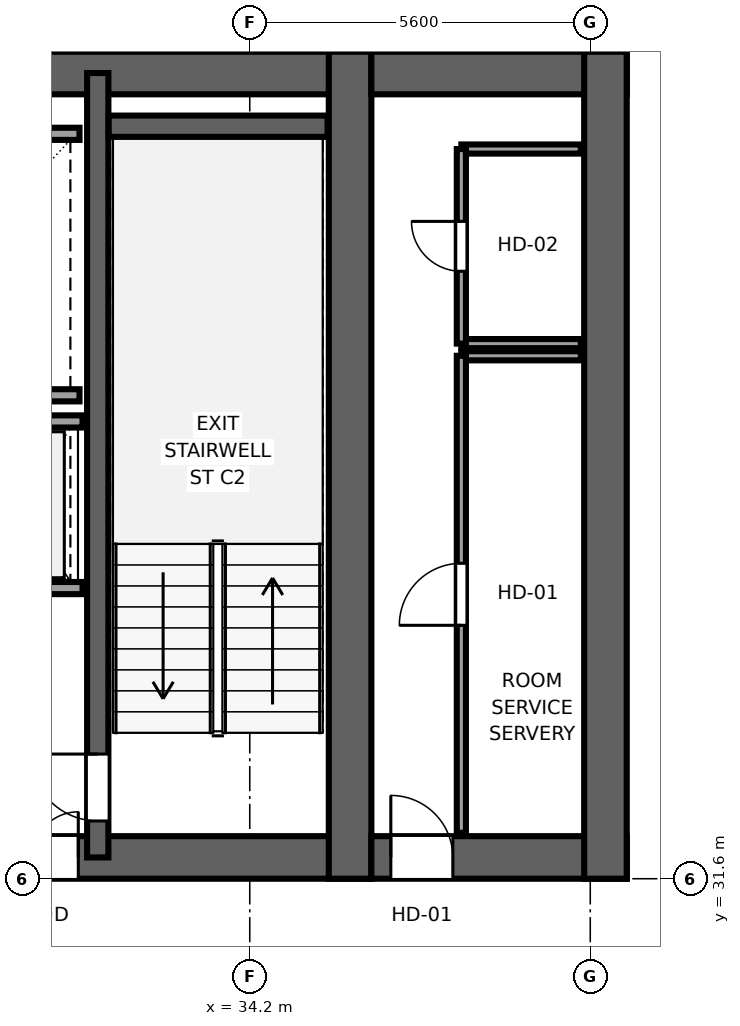
"""IFC4 building model, lengths in metres.
Left out: names, types, materials, properties, quantities, classifications, styles, units other than length and angle.
Written with IfcOpenShell. Run it as: python <this file> out.ifc"""

import sys

from ifc_helpers import new_model, si_unit, direction, frame, frame_2d, origin, place, context, subcontext, project, spatial, rectangle, extrude, source, transform, mapped, element, fill, save


model = new_model("IFC4")
c1 = context("Model", 3, precision=1e-05, world=origin(), true_north=direction((0.0, 1.0)))
c2 = subcontext(c1, "Body", "Model", "MODEL_VIEW")
j1 = project(units=[si_unit("LENGTHUNIT", "METRE"), si_unit("PLANEANGLEUNIT", "RADIAN")], contexts=[c1])
p1 = place(None, origin())
s1 = spatial("IfcSite", under=j1, at=p1, CompositionType="ELEMENT")
p2 = place(p1, origin())
s2 = spatial("IfcBuilding", under=s1, at=p2, CompositionType="ELEMENT")
p3 = place(p2, frame((0.0, 0.0, 104.45)))
s3 = spatial("IfcBuildingStorey", under=s2, at=p3, CompositionType="ELEMENT", Elevation=104.45)
p4 = place(p3, frame((9.8, 31.95, 0.0), z_axis=(0.0, 0.0, 1.0), x_axis=(1.0, 0.0, 0.0)))
e1 = element("IfcWall", 1, at=p4, inside=s3, PredefinedType="SHEAR", context=c2, shape_type="SweptSolid", body=[
    extrude(rectangle(XDim=26.4, YDim=0.7, at=frame_2d((13.2, 0.0))), origin(), (0.0, 0.0, 1.0), 3.55),
])
p5 = place(p4, frame((6.32, 0.0, 0.0), z_axis=(0.0, 0.0, 1.0), x_axis=(-1.0, 0.0, 0.0)))
e2 = element("IfcOpeningElement", 2, at=p5, cuts=e1, PredefinedType="OPENING", context=c2, shape_type="SweptSolid", body=[
    extrude(rectangle(XDim=1.5, YDim=2.04, at=frame_2d((0.75, 1.02))), frame((0.0, 0.36, 0.0), z_axis=(0.0, -1.0, 0.0), x_axis=(1.0, 0.0, 0.0)), (0.0, 0.0, 1.0), 0.72),
])
p6 = place(p4, frame((13.95, 0.0, 0.0), z_axis=(0.0, 0.0, 1.0), x_axis=(-1.0, 0.0, 0.0)))
e3 = element("IfcOpeningElement", 3, at=p6, cuts=e1, PredefinedType="OPENING", context=c2, shape_type="SweptSolid", body=[
    extrude(rectangle(XDim=1.5, YDim=2.04, at=frame_2d((0.75, 1.02))), frame((0.0, 0.36, 0.0), z_axis=(0.0, -1.0, 0.0), x_axis=(1.0, 0.0, 0.0)), (0.0, 0.0, 1.0), 0.72),
])
p7 = place(p4, frame((21.58, 0.0, 0.0), z_axis=(0.0, 0.0, 1.0), x_axis=(-1.0, 0.0, 0.0)))
e4 = element("IfcOpeningElement", 4, at=p7, cuts=e1, PredefinedType="OPENING", context=c2, shape_type="SweptSolid", body=[
    extrude(rectangle(XDim=1.5, YDim=2.04, at=frame_2d((0.75, 1.02))), frame((0.0, 0.36, 0.0), z_axis=(0.0, -1.0, 0.0), x_axis=(1.0, 0.0, 0.0)), (0.0, 0.0, 1.0), 0.72),
])
p8 = place(p4, frame((8.37, 0.0, 0.0), z_axis=(0.0, 0.0, 1.0), x_axis=(-1.0, 0.0, 0.0)))
e5 = element("IfcOpeningElement", 5, at=p8, cuts=e1, PredefinedType="OPENING", context=c2, shape_type="SweptSolid", body=[
    extrude(rectangle(XDim=0.82, YDim=2.01, at=frame_2d((0.41, 1.005))), frame((0.0, 0.36, 0.0), z_axis=(0.0, -1.0, 0.0), x_axis=(1.0, 0.0, 0.0)), (0.0, 0.0, 1.0), 0.72),
])
p9 = place(p4, frame((18.87, 0.0, 0.0), z_axis=(0.0, 0.0, 1.0), x_axis=(-1.0, 0.0, 0.0)))
e6 = element("IfcOpeningElement", 6, at=p9, cuts=e1, PredefinedType="OPENING", context=c2, shape_type="SweptSolid", body=[
    extrude(rectangle(XDim=0.82, YDim=2.01, at=frame_2d((0.41, 1.005))), frame((0.0, 0.36, 0.0), z_axis=(0.0, -1.0, 0.0), x_axis=(1.0, 0.0, 0.0)), (0.0, 0.0, 1.0), 0.72),
])
p10 = place(p3, frame((9.8, 44.85, 0.0), z_axis=(0.0, 0.0, 1.0), x_axis=(1.0, 0.0, 0.0)))
e7 = element("IfcWall", 7, at=p10, inside=s3, PredefinedType="SHEAR", context=c2, shape_type="SweptSolid", body=[
    extrude(rectangle(XDim=26.4, YDim=0.7, at=frame_2d((13.2, 0.0))), origin(), (0.0, 0.0, 1.0), 3.55),
])
p11 = place(p3, frame((35.85, 31.6, 0.0), z_axis=(0.0, 0.0, 1.0), x_axis=(0.0, 1.0, 0.0)))
e8 = element("IfcWall", 8, at=p11, inside=s3, PredefinedType="SHEAR", context=c2, shape_type="SweptSolid", body=[
    extrude(rectangle(XDim=13.6, YDim=0.7, at=frame_2d((6.8, 0.0))), origin(), (0.0, 0.0, 1.0), 3.55),
])
p12 = place(p3, frame((31.7, 31.95, 0.0), z_axis=(0.0, 0.0, 1.0), x_axis=(0.0, 1.0, 0.0)))
e9 = element("IfcWall", 9, at=p12, inside=s3, PredefinedType="SHEAR", context=c2, shape_type="SweptSolid", body=[
    extrude(rectangle(XDim=12.9, YDim=0.35, at=frame_2d((6.45, 0.0))), origin(), (0.0, 0.0, 1.0), 3.55),
])
p13 = place(p12, frame((1.7, 0.0, 0.0), z_axis=(0.0, 0.0, 1.0), x_axis=(-1.0, 0.0, 0.0)))
e10 = element("IfcOpeningElement", 10, at=p13, cuts=e9, PredefinedType="OPENING", context=c2, shape_type="SweptSolid", body=[
    extrude(rectangle(XDim=1.1, YDim=2.12, at=frame_2d((0.55, 1.06))), frame((0.0, 0.185, 0.0), z_axis=(0.0, -1.0, 0.0), x_axis=(1.0, 0.0, 0.0)), (0.0, 0.0, 1.0), 0.37),
])
p14 = place(p3, frame((36.2, 31.95, 0.0), z_axis=(0.0, 0.0, 1.0), x_axis=(1.0, 0.0, 0.0)))
e11 = element("IfcWall", 11, at=p14, inside=s3, PredefinedType="SHEAR", context=c2, shape_type="SweptSolid", body=[
    extrude(rectangle(XDim=4.2, YDim=0.7, at=frame_2d((2.1, 0.0))), origin(), (0.0, 0.0, 1.0), 3.55),
])
p15 = place(p14, frame((1.34, 0.0, 0.0), z_axis=(0.0, 0.0, 1.0), x_axis=(-1.0, 0.0, 0.0)))
e12 = element("IfcOpeningElement", 12, at=p15, cuts=e11, PredefinedType="OPENING", context=c2, shape_type="SweptSolid", body=[
    extrude(rectangle(XDim=1.02, YDim=2.03, at=frame_2d((0.51, 1.015))), frame((0.0, 0.36, 0.0), z_axis=(0.0, -1.0, 0.0), x_axis=(1.0, 0.0, 0.0)), (0.0, 0.0, 1.0), 0.72),
])
p16 = place(p3, frame((36.2, 44.85, 0.0), z_axis=(0.0, 0.0, 1.0), x_axis=(1.0, 0.0, 0.0)))
e13 = element("IfcWall", 13, at=p16, inside=s3, PredefinedType="SHEAR", context=c2, shape_type="SweptSolid", body=[
    extrude(rectangle(XDim=4.2, YDim=0.7, at=frame_2d((2.1, 0.0))), origin(), (0.0, 0.0, 1.0), 3.55),
])
p17 = place(p3, frame((40.05, 31.6, 0.0), z_axis=(0.0, 0.0, 1.0), x_axis=(0.0, 1.0, 0.0)))
e14 = element("IfcWall", 14, at=p17, inside=s3, PredefinedType="SHEAR", context=c2, shape_type="SweptSolid", body=[
    extrude(rectangle(XDim=13.6, YDim=0.7, at=frame_2d((6.8, 0.0))), origin(), (0.0, 0.0, 1.0), 3.55),
])
p18 = place(p3, frame((31.88, 43.975, 0.0), z_axis=(0.0, 0.0, 1.0), x_axis=(1.0, 0.0, 0.0)))
e15 = element("IfcWall", 15, at=p18, inside=s3, PredefinedType="SHEAR", context=c2, shape_type="SweptSolid", body=[
    extrude(rectangle(XDim=3.6, YDim=0.35, at=frame_2d((1.8, 0.0))), origin(), (0.0, 0.0, 1.0), 3.55),
])
for number, where, z_axis, x_axis in (
    (16, (27.3, 39.55, 0.0), (0.0, 0.0, 1.0), (1.0, 0.0, 0.0)),
    (17, (27.3, 43.85, 0.0), (0.0, 0.0, 1.0), (1.0, 0.0, 0.0)),
):
    element("IfcWall", number, at=place(p3, frame(where, z_axis=z_axis, x_axis=x_axis)), inside=s3, PredefinedType="SOLIDWALL", context=c2, shape_type="SweptSolid", body=[
        extrude(rectangle(XDim=4.1, YDim=0.2, at=frame_2d((2.05, 0.0))), origin(), (0.0, 0.0, 1.0), 3.37),
    ])
p19 = place(p3, frame((27.375, 36.38, 0.0), z_axis=(0.0, 0.0, 1.0), x_axis=(1.0, 0.0, 0.0)))
e18 = element("IfcWall", 18, at=p19, inside=s3, PredefinedType="SOLIDWALL", context=c2, shape_type="SweptSolid", body=[
    extrude(rectangle(XDim=4.075, YDim=0.2, at=frame_2d((2.038, 0.0))), origin(), (0.0, 0.0, 1.0), 3.37),
])
p20 = place(p19, frame((0.525, 0.0, 0.0)))
e19 = element("IfcOpeningElement", 19, at=p20, cuts=e18, PredefinedType="OPENING", context=c2, shape_type="SweptSolid", body=[
    extrude(rectangle(XDim=1.1, YDim=2.12, at=frame_2d((0.55, 1.06))), frame((0.0, 0.11, 0.0), z_axis=(0.0, -1.0, 0.0), x_axis=(1.0, 0.0, 0.0)), (0.0, 0.0, 1.0), 0.22),
])
p21 = place(p19, frame((2.425, 0.0, 0.0)))
e20 = element("IfcOpeningElement", 20, at=p21, cuts=e18, PredefinedType="OPENING", context=c2, shape_type="SweptSolid", body=[
    extrude(rectangle(XDim=1.1, YDim=2.12, at=frame_2d((0.55, 1.06))), frame((0.0, 0.11, 0.0), z_axis=(0.0, -1.0, 0.0), x_axis=(1.0, 0.0, 0.0)), (0.0, 0.0, 1.0), 0.22),
])
p22 = place(p3, frame((27.375, 39.12, 0.0), z_axis=(0.0, 0.0, 1.0), x_axis=(1.0, 0.0, 0.0)))
e21 = element("IfcWall", 21, at=p22, inside=s3, PredefinedType="SOLIDWALL", context=c2, shape_type="SweptSolid", body=[
    extrude(rectangle(XDim=4.075, YDim=0.2, at=frame_2d((2.038, 0.0))), origin(), (0.0, 0.0, 1.0), 3.37),
])
p23 = place(p3, frame((37.68, 40.2, 0.0), z_axis=(0.0, 0.0, 1.0), x_axis=(1.0, 0.0, 0.0)))
e22 = element("IfcWall", 22, at=p23, inside=s3, PredefinedType="PARTITIONING", context=c2, shape_type="SweptSolid", body=[
    extrude(rectangle(XDim=1.965, YDim=0.15, at=frame_2d((0.982, 0.0))), origin(), (0.0, 0.0, 1.0), 3.37),
])
p24 = place(p3, frame((37.68, 32.355, 0.0), z_axis=(0.0, 0.0, 1.0), x_axis=(0.0, 1.0, 0.0)))
e23 = element("IfcWall", 23, at=p24, inside=s3, PredefinedType="PARTITIONING", context=c2, shape_type="SweptSolid", body=[
    extrude(rectangle(XDim=7.845, YDim=0.15, at=frame_2d((3.922, 0.0))), origin(), (0.0, 0.0, 1.0), 3.37),
])
p25 = place(p24, frame((3.413, 0.0, 0.0)))
e24 = element("IfcOpeningElement", 24, at=p25, cuts=e23, PredefinedType="OPENING", context=c2, shape_type="SweptSolid", body=[
    extrude(rectangle(XDim=1.02, YDim=2.03, at=frame_2d((0.51, 1.015))), frame((0.0, 0.085, 0.0), z_axis=(0.0, -1.0, 0.0), x_axis=(1.0, 0.0, 0.0)), (0.0, 0.0, 1.0), 0.17),
])
for number, where, z_axis, x_axis in (
    (25, (37.68, 40.4, 0.0), (0.0, 0.0, 1.0), (1.0, 0.0, 0.0)),
    (26, (37.68, 43.6, 0.0), (0.0, 0.0, 1.0), (1.0, 0.0, 0.0)),
):
    element("IfcWall", number, at=place(p3, frame(where, z_axis=z_axis, x_axis=x_axis)), inside=s3, PredefinedType="PARTITIONING", context=c2, shape_type="SweptSolid", body=[
        extrude(rectangle(XDim=1.965, YDim=0.15, at=frame_2d((0.982, 0.0))), origin(), (0.0, 0.0, 1.0), 3.37),
    ])
p26 = place(p3, frame((37.68, 40.4, 0.0), z_axis=(0.0, 0.0, 1.0), x_axis=(0.0, 1.0, 0.0)))
e27 = element("IfcWall", 27, at=p26, inside=s3, PredefinedType="PARTITIONING", context=c2, shape_type="SweptSolid", body=[
    extrude(rectangle(XDim=3.2, YDim=0.15, at=frame_2d((1.6, 0.0))), origin(), (0.0, 0.0, 1.0), 3.37),
])
p27 = place(p26, frame((1.19, 0.0, 0.0)))
e28 = element("IfcOpeningElement", 28, at=p27, cuts=e27, PredefinedType="OPENING", context=c2, shape_type="SweptSolid", body=[
    extrude(rectangle(XDim=0.82, YDim=2.01, at=frame_2d((0.41, 1.005))), frame((0.0, 0.085, 0.0), z_axis=(0.0, -1.0, 0.0), x_axis=(1.0, 0.0, 0.0)), (0.0, 0.0, 1.0), 0.17),
])
m1 = source(origin(), c2, "Body", "SweptSolid", [
    extrude(rectangle(XDim=1.1, YDim=2.12, at=frame_2d((0.55, 1.06))), frame((0.0, 0.025, 0.0), z_axis=(0.0, -1.0, 0.0), x_axis=(1.0, 0.0, 0.0)), (0.0, 0.0, 1.0), 0.05),
])
p28 = place(p13, origin())
e29 = element("IfcDoor", 29, at=p28, inside=s3, OperationType="SINGLE_SWING_RIGHT", PredefinedType="DOOR", context=c2, shape_type="MappedRepresentation", body=[
    mapped(m1, transform((0.0, 0.0, 0.0), x_axis=(1.0, 0.0, 0.0), y_axis=(0.0, 1.0, 0.0), z_axis=(0.0, 0.0, 1.0), scale=1.0)),
])
fill(e10, e29)
m2 = source(origin(), c2, "Body", "SweptSolid", [
    extrude(rectangle(XDim=1.5, YDim=2.04, at=frame_2d((0.75, 1.02))), frame((0.0, 0.025, 0.0), z_axis=(0.0, -1.0, 0.0), x_axis=(1.0, 0.0, 0.0)), (0.0, 0.0, 1.0), 0.05),
])
p29 = place(p7, origin())
e30 = element("IfcDoor", 30, at=p29, inside=s3, OperationType="DOUBLE_DOOR_SINGLE_SWING", PredefinedType="DOOR", context=c2, shape_type="MappedRepresentation", body=[
    mapped(m2, transform((0.0, 0.0, 0.0), x_axis=(1.0, 0.0, 0.0), y_axis=(0.0, 1.0, 0.0), z_axis=(0.0, 0.0, 1.0), scale=1.0)),
])
fill(e4, e30)
m3 = source(origin(), c2, "Body", "SweptSolid", [
    extrude(rectangle(XDim=1.02, YDim=2.03, at=frame_2d((0.51, 1.015))), frame((0.0, 0.025, 0.0), z_axis=(0.0, -1.0, 0.0), x_axis=(1.0, 0.0, 0.0)), (0.0, 0.0, 1.0), 0.05),
])
p30 = place(p15, origin())
e31 = element("IfcDoor", 31, at=p30, inside=s3, OperationType="SINGLE_SWING_LEFT", PredefinedType="DOOR", context=c2, shape_type="MappedRepresentation", body=[
    mapped(m3, transform((0.0, 0.0, 0.0), x_axis=(1.0, 0.0, 0.0), y_axis=(0.0, 1.0, 0.0), z_axis=(0.0, 0.0, 1.0), scale=1.0)),
])
fill(e12, e31)
p31 = place(p25, origin())
e32 = element("IfcDoor", 32, at=p31, inside=s3, OperationType="SINGLE_SWING_LEFT", PredefinedType="DOOR", context=c2, shape_type="MappedRepresentation", body=[
    mapped(m3, transform((0.0, 0.0, 0.0), x_axis=(1.0, 0.0, 0.0), y_axis=(0.0, 1.0, 0.0), z_axis=(0.0, 0.0, 1.0), scale=1.0)),
])
fill(e24, e32)
m4 = source(origin(), c2, "Body", "SweptSolid", [
    extrude(rectangle(XDim=0.82, YDim=2.01, at=frame_2d((0.41, 1.005))), frame((0.0, 0.025, 0.0), z_axis=(0.0, -1.0, 0.0), x_axis=(1.0, 0.0, 0.0)), (0.0, 0.0, 1.0), 0.05),
])
p32 = place(p27, origin())
e33 = element("IfcDoor", 33, at=p32, inside=s3, OperationType="SINGLE_SWING_RIGHT", PredefinedType="DOOR", context=c2, shape_type="MappedRepresentation", body=[
    mapped(m4, transform((0.0, 0.0, 0.0), x_axis=(1.0, 0.0, 0.0), y_axis=(0.0, 1.0, 0.0), z_axis=(0.0, 0.0, 1.0), scale=1.0)),
])
fill(e28, e33)
save(model, sys.argv[1])
